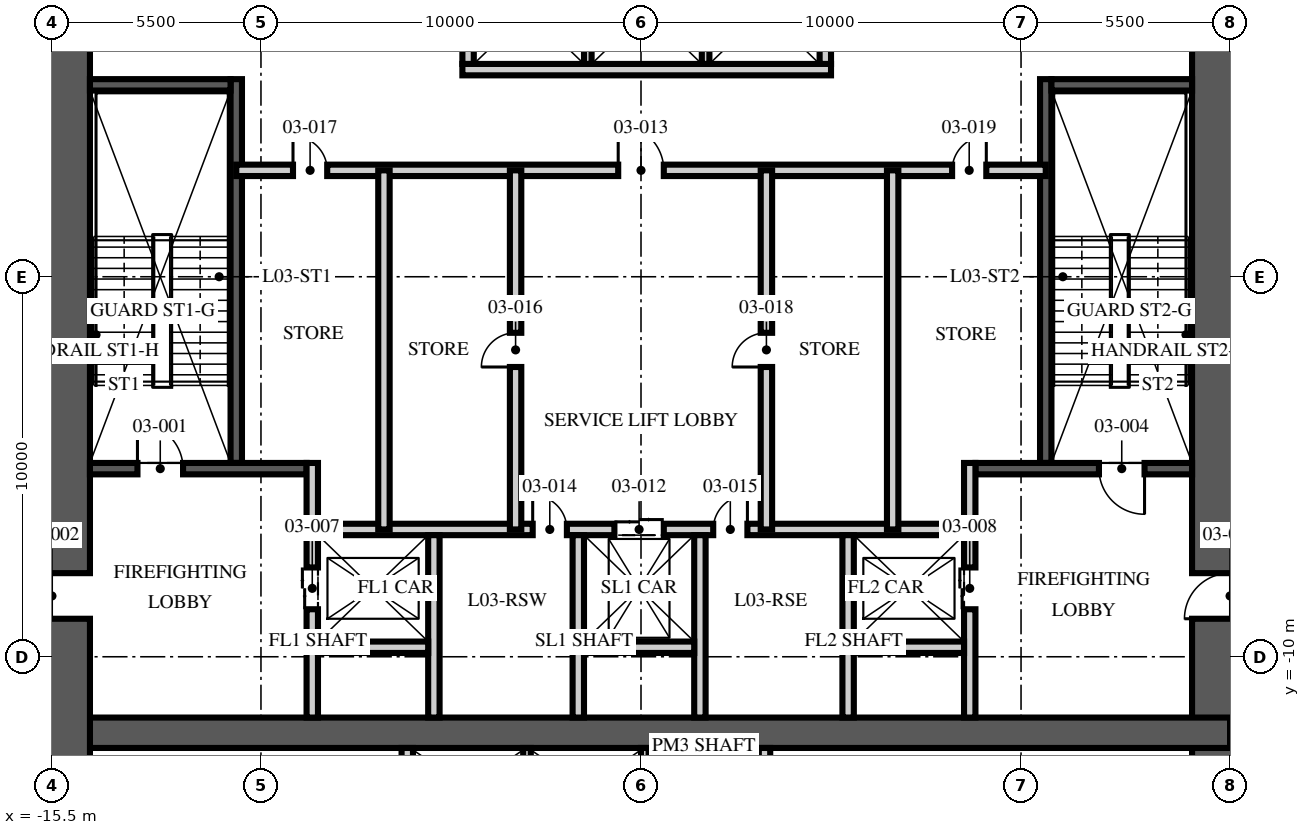
"""IFC4 building model, lengths in metres.
Left out: names, types, materials, properties, quantities, classifications, styles, units other than length and angle.
Written with IfcOpenShell. Run it as: python <this file> out.ifc"""

import sys

from ifc_helpers import new_model, si_unit, direction, frame, frame_2d, origin, place, context, subcontext, project, spatial, rectangle, extrude, element, fill, save


model = new_model("IFC4")
c1 = context("Model", 3, precision=1e-05, world=origin(), true_north=direction((0.0, 1.0)))
c2 = subcontext(c1, "Body", "Model", "MODEL_VIEW")
j1 = project(units=[si_unit("LENGTHUNIT", "METRE"), si_unit("PLANEANGLEUNIT", "RADIAN")], contexts=[c1])
p1 = place(None, origin())
s1 = spatial("IfcSite", under=j1, at=p1, CompositionType="ELEMENT")
p2 = place(p1, origin())
s2 = spatial("IfcBuilding", under=s1, at=p2, CompositionType="ELEMENT")
p3 = place(p2, frame((0.0, 0.0, 16.0)))
s3 = spatial("IfcBuildingStorey", under=s2, at=p3, CompositionType="ELEMENT", Elevation=16.0)
p4 = place(p3, frame((15.5, -15.5, -0.3), z_axis=(0.0, 0.0, 1.0), x_axis=(0.0, 1.0, 0.0)))
e1 = element("IfcWall", 1, at=p4, inside=s3, PredefinedType="SHEAR", context=c2, shape_type="SweptSolid", body=[
    extrude(rectangle(XDim=31.0, YDim=2.0, at=frame_2d((15.5, 0.0))), origin(), (0.0, 0.0, 1.0), 5.05),
])
p5 = place(p4, frame((6.5, 0.0, 0.3)))
e2 = element("IfcOpeningElement", 2, at=p5, cuts=e1, PredefinedType="OPENING", context=c2, shape_type="SweptSolid", body=[
    extrude(rectangle(XDim=1.2, YDim=2.1, at=frame_2d((0.6, 1.05))), frame((0.0, 1.01, 0.0), z_axis=(0.0, -1.0, 0.0), x_axis=(1.0, 0.0, 0.0)), (0.0, 0.0, 1.0), 2.02),
])
p6 = place(p4, frame((23.0, 0.0, 0.3)))
e3 = element("IfcOpeningElement", 3, at=p6, cuts=e1, PredefinedType="OPENING", context=c2, shape_type="SweptSolid", body=[
    extrude(rectangle(XDim=1.8, YDim=2.1, at=frame_2d((0.9, 1.05))), frame((0.0, 1.01, 0.0), z_axis=(0.0, -1.0, 0.0), x_axis=(1.0, 0.0, 0.0)), (0.0, 0.0, 1.0), 2.02),
])
p7 = place(p3, frame((-15.5, -12.0, -0.3), z_axis=(0.0, 0.0, 1.0), x_axis=(1.0, 0.0, 0.0)))
e4 = element("IfcWall", 4, at=p7, inside=s3, PredefinedType="SHEAR", context=c2, shape_type="SweptSolid", body=[
    extrude(rectangle(XDim=31.0, YDim=0.8, at=frame_2d((15.5, 0.0))), origin(), (0.0, 0.0, 1.0), 5.05),
])
p8 = place(p3, frame((-15.5, -15.5, -0.3), z_axis=(0.0, 0.0, 1.0), x_axis=(0.0, 1.0, 0.0)))
e5 = element("IfcWall", 5, at=p8, inside=s3, PredefinedType="SHEAR", context=c2, shape_type="SweptSolid", body=[
    extrude(rectangle(XDim=31.0, YDim=2.0, at=frame_2d((15.5, 0.0))), origin(), (0.0, 0.0, 1.0), 5.05),
])
p9 = place(p8, frame((6.5, 0.0, 0.3)))
e6 = element("IfcOpeningElement", 6, at=p9, cuts=e5, PredefinedType="OPENING", context=c2, shape_type="SweptSolid", body=[
    extrude(rectangle(XDim=1.2, YDim=2.1, at=frame_2d((0.6, 1.05))), frame((0.0, 1.01, 0.0), z_axis=(0.0, -1.0, 0.0), x_axis=(1.0, 0.0, 0.0)), (0.0, 0.0, 1.0), 2.02),
])
p10 = place(p8, frame((23.0, 0.0, 0.3)))
e7 = element("IfcOpeningElement", 7, at=p10, cuts=e5, PredefinedType="OPENING", context=c2, shape_type="SweptSolid", body=[
    extrude(rectangle(XDim=1.8, YDim=2.1, at=frame_2d((0.9, 1.05))), frame((0.0, 1.01, 0.0), z_axis=(0.0, -1.0, 0.0), x_axis=(1.0, 0.0, 0.0)), (0.0, 0.0, 1.0), 2.02),
])
p11 = place(p3, frame((-10.65, -4.9, 0.0), z_axis=(0.0, 0.0, 1.0), x_axis=(0.0, 1.0, 0.0)))
e8 = element("IfcWall", 8, at=p11, inside=s3, PredefinedType="SOLIDWALL", context=c2, shape_type="SweptSolid", body=[
    extrude(rectangle(XDim=10.1, YDim=0.3, at=frame_2d((5.05, 0.0))), origin(), (0.0, 0.0, 1.0), 4.75),
])
p12 = place(p3, frame((-14.5, -5.05, 0.0), z_axis=(0.0, 0.0, 1.0), x_axis=(1.0, 0.0, 0.0)))
e9 = element("IfcWall", 9, at=p12, inside=s3, PredefinedType="SOLIDWALL", context=c2, shape_type="SweptSolid", body=[
    extrude(rectangle(XDim=5.7, YDim=0.3, at=frame_2d((2.85, 0.0))), origin(), (0.0, 0.0, 1.0), 4.75),
])
p13 = place(p12, frame((1.25, 0.0, 0.0)))
e10 = element("IfcOpeningElement", 10, at=p13, cuts=e9, PredefinedType="OPENING", context=c2, shape_type="SweptSolid", body=[
    extrude(rectangle(XDim=1.2, YDim=2.1, at=frame_2d((0.6, 1.05))), frame((0.0, 0.16, 0.0), z_axis=(0.0, -1.0, 0.0), x_axis=(1.0, 0.0, 0.0)), (0.0, 0.0, 1.0), 0.32),
])
p14 = place(p3, frame((-14.5, 5.05, 0.0), z_axis=(0.0, 0.0, 1.0), x_axis=(1.0, 0.0, 0.0)))
e11 = element("IfcWall", 11, at=p14, inside=s3, PredefinedType="SOLIDWALL", context=c2, shape_type="SweptSolid", body=[
    extrude(rectangle(XDim=3.7, YDim=0.3, at=frame_2d((1.85, 0.0))), origin(), (0.0, 0.0, 1.0), 4.75),
])
p15 = place(p3, frame((-8.65, -11.6, 0.0), z_axis=(0.0, 0.0, 1.0), x_axis=(0.0, 1.0, 0.0)))
e12 = element("IfcWall", 12, at=p15, inside=s3, PredefinedType="PARTITIONING", context=c2, shape_type="SweptSolid", body=[
    extrude(rectangle(XDim=6.7, YDim=0.3, at=frame_2d((3.35, 0.0))), origin(), (0.0, 0.0, 1.0), 4.75),
])
p16 = place(p15, frame((2.85, 0.0, 0.0)))
e13 = element("IfcOpeningElement", 13, at=p16, cuts=e12, PredefinedType="OPENING", context=c2, shape_type="SweptSolid", body=[
    extrude(rectangle(XDim=1.1, YDim=2.1, at=frame_2d((0.55, 1.05))), frame((0.0, 0.16, 0.0), z_axis=(0.0, -1.0, 0.0), x_axis=(1.0, 0.0, 0.0)), (0.0, 0.0, 1.0), 0.32),
])
p17 = place(p3, frame((10.65, -4.9, 0.0), z_axis=(0.0, 0.0, 1.0), x_axis=(0.0, 1.0, 0.0)))
e14 = element("IfcWall", 14, at=p17, inside=s3, PredefinedType="SOLIDWALL", context=c2, shape_type="SweptSolid", body=[
    extrude(rectangle(XDim=10.1, YDim=0.3, at=frame_2d((5.05, 0.0))), origin(), (0.0, 0.0, 1.0), 4.75),
])
p18 = place(p3, frame((14.5, -5.05, 0.0), z_axis=(0.0, 0.0, 1.0), x_axis=(-1.0, 0.0, 0.0)))
e15 = element("IfcWall", 15, at=p18, inside=s3, PredefinedType="SOLIDWALL", context=c2, shape_type="SweptSolid", body=[
    extrude(rectangle(XDim=5.7, YDim=0.3, at=frame_2d((2.85, 0.0))), origin(), (0.0, 0.0, 1.0), 4.75),
])
p19 = place(p18, frame((1.25, 0.0, 0.0)))
e16 = element("IfcOpeningElement", 16, at=p19, cuts=e15, PredefinedType="OPENING", context=c2, shape_type="SweptSolid", body=[
    extrude(rectangle(XDim=1.2, YDim=2.1, at=frame_2d((0.6, 1.05))), frame((0.0, 0.16, 0.0), z_axis=(0.0, -1.0, 0.0), x_axis=(1.0, 0.0, 0.0)), (0.0, 0.0, 1.0), 0.32),
])
p20 = place(p3, frame((14.5, 5.05, 0.0), z_axis=(0.0, 0.0, 1.0), x_axis=(-1.0, 0.0, 0.0)))
e17 = element("IfcWall", 17, at=p20, inside=s3, PredefinedType="SOLIDWALL", context=c2, shape_type="SweptSolid", body=[
    extrude(rectangle(XDim=3.7, YDim=0.3, at=frame_2d((1.85, 0.0))), origin(), (0.0, 0.0, 1.0), 4.75),
])
p21 = place(p3, frame((8.65, -11.6, 0.0), z_axis=(0.0, 0.0, 1.0), x_axis=(0.0, 1.0, 0.0)))
e18 = element("IfcWall", 18, at=p21, inside=s3, PredefinedType="PARTITIONING", context=c2, shape_type="SweptSolid", body=[
    extrude(rectangle(XDim=6.7, YDim=0.3, at=frame_2d((3.35, 0.0))), origin(), (0.0, 0.0, 1.0), 4.75),
])
p22 = place(p21, frame((2.85, 0.0, 0.0)))
e19 = element("IfcOpeningElement", 19, at=p22, cuts=e18, PredefinedType="OPENING", context=c2, shape_type="SweptSolid", body=[
    extrude(rectangle(XDim=1.1, YDim=2.1, at=frame_2d((0.55, 1.05))), frame((0.0, 0.16, 0.0), z_axis=(0.0, -1.0, 0.0), x_axis=(1.0, 0.0, 0.0)), (0.0, 0.0, 1.0), 0.32),
])
p23 = place(p3, frame((-8.5, -6.65, 0.0), z_axis=(0.0, 0.0, 1.0), x_axis=(1.0, 0.0, 0.0)))
e20 = element("IfcWall", 20, at=p23, inside=s3, PredefinedType="PARTITIONING", context=c2, shape_type="SweptSolid", body=[
    extrude(rectangle(XDim=17.0, YDim=0.3, at=frame_2d((8.5, 0.0))), origin(), (0.0, 0.0, 1.0), 4.75),
])
p24 = place(p23, frame((7.8, 0.0, 0.0)))
e21 = element("IfcOpeningElement", 21, at=p24, cuts=e20, PredefinedType="OPENING", context=c2, shape_type="SweptSolid", body=[
    extrude(rectangle(XDim=1.3, YDim=2.4, at=frame_2d((0.65, 1.2))), frame((0.0, 0.16, 0.0), z_axis=(0.0, -1.0, 0.0), x_axis=(1.0, 0.0, 0.0)), (0.0, 0.0, 1.0), 0.32),
])
p25 = place(p23, frame((5.65, 0.0, 0.0)))
e22 = element("IfcOpeningElement", 22, at=p25, cuts=e20, PredefinedType="OPENING", context=c2, shape_type="SweptSolid", body=[
    extrude(rectangle(XDim=0.9, YDim=2.1, at=frame_2d((0.45, 1.05))), frame((0.0, 0.16, 0.0), z_axis=(0.0, -1.0, 0.0), x_axis=(1.0, 0.0, 0.0)), (0.0, 0.0, 1.0), 0.32),
])
p26 = place(p23, frame((10.4, 0.0, 0.0)))
e23 = element("IfcOpeningElement", 23, at=p26, cuts=e20, PredefinedType="OPENING", context=c2, shape_type="SweptSolid", body=[
    extrude(rectangle(XDim=0.9, YDim=2.1, at=frame_2d((0.45, 1.05))), frame((0.0, 0.16, 0.0), z_axis=(0.0, -1.0, 0.0), x_axis=(1.0, 0.0, 0.0)), (0.0, 0.0, 1.0), 0.32),
])
for number, where, z_axis, x_axis in (
    (24, (-5.45, -11.6, 0.0), (0.0, 0.0, 1.0), (0.0, 1.0, 0.0)),
    (25, (-1.65, -11.6, 0.0), (0.0, 0.0, 1.0), (0.0, 1.0, 0.0)),
    (26, (1.55, -11.6, 0.0), (0.0, 0.0, 1.0), (0.0, 1.0, 0.0)),
    (27, (5.45, -11.6, 0.0), (0.0, 0.0, 1.0), (0.0, 1.0, 0.0)),
):
    element("IfcWall", number, at=place(p3, frame(where, z_axis=z_axis, x_axis=x_axis)), inside=s3, PredefinedType="PARTITIONING", context=c2, shape_type="SweptSolid", body=[
        extrude(rectangle(XDim=4.8, YDim=0.3, at=frame_2d((2.4, 0.0))), origin(), (0.0, 0.0, 1.0), 4.75),
    ])
for number, where, z_axis, x_axis in (
    (28, (-8.5, -9.75, 0.0), (0.0, 0.0, 1.0), (1.0, 0.0, 0.0)),
    (29, (-1.5, -9.75, 0.0), (0.0, 0.0, 1.0), (1.0, 0.0, 0.0)),
    (30, (5.6, -9.75, 0.0), (0.0, 0.0, 1.0), (1.0, 0.0, 0.0)),
):
    element("IfcWall", number, at=place(p3, frame(where, z_axis=z_axis, x_axis=x_axis)), inside=s3, PredefinedType="PARTITIONING", context=c2, shape_type="SweptSolid", body=[
        extrude(rectangle(XDim=2.9, YDim=0.3, at=frame_2d((1.45, 0.0))), origin(), (0.0, 0.0, 1.0), 4.75),
    ])
p27 = place(p3, frame((-4.7, 5.45, 0.0), z_axis=(0.0, 0.0, 1.0), x_axis=(1.0, 0.0, 0.0)))
e31 = element("IfcWall", 31, at=p27, inside=s3, PredefinedType="PARTITIONING", context=c2, shape_type="SweptSolid", body=[
    extrude(rectangle(XDim=9.7, YDim=0.3, at=frame_2d((4.85, 0.0))), origin(), (0.0, 0.0, 1.0), 4.75),
])
for number, where, z_axis, x_axis in (
    (32, (-4.55, 5.6, 0.0), (0.0, 0.0, 1.0), (0.0, 1.0, 0.0)),
    (33, (4.85, 5.6, 0.0), (0.0, 0.0, 1.0), (0.0, 1.0, 0.0)),
):
    element("IfcWall", number, at=place(p3, frame(where, z_axis=z_axis, x_axis=x_axis)), inside=s3, PredefinedType="PARTITIONING", context=c2, shape_type="SweptSolid", body=[
        extrude(rectangle(XDim=2.8, YDim=0.3, at=frame_2d((1.4, 0.0))), origin(), (0.0, 0.0, 1.0), 4.75),
    ])
for number, where, z_axis, x_axis in (
    (34, (-1.4, 5.6, 0.0), (0.0, 0.0, 1.0), (0.0, 1.0, 0.0)),
    (35, (1.7, 5.6, 0.0), (0.0, 0.0, 1.0), (0.0, 1.0, 0.0)),
):
    element("IfcWall", number, at=place(p3, frame(where, z_axis=z_axis, x_axis=x_axis)), inside=s3, PredefinedType="PARTITIONING", context=c2, shape_type="SweptSolid", body=[
        extrude(rectangle(XDim=2.8, YDim=0.2, at=frame_2d((1.4, 0.0))), origin(), (0.0, 0.0, 1.0), 4.75),
    ])
for number, where, z_axis, x_axis in (
    (36, (-6.15, -14.5, 0.0), (0.0, 0.0, 1.0), (0.0, 1.0, 0.0)),
    (37, (3.25, -14.5, 0.0), (0.0, 0.0, 1.0), (0.0, 1.0, 0.0)),
):
    element("IfcWall", number, at=place(p3, frame(where, z_axis=z_axis, x_axis=x_axis)), inside=s3, PredefinedType="PARTITIONING", context=c2, shape_type="SweptSolid", body=[
        extrude(rectangle(XDim=2.1, YDim=0.3, at=frame_2d((1.05, 0.0))), origin(), (0.0, 0.0, 1.0), 4.75),
    ])
for number, where, z_axis, x_axis in (
    (38, (-3.0, -14.5, 0.0), (0.0, 0.0, 1.0), (0.0, 1.0, 0.0)),
    (39, (0.1, -14.5, 0.0), (0.0, 0.0, 1.0), (0.0, 1.0, 0.0)),
):
    element("IfcWall", number, at=place(p3, frame(where, z_axis=z_axis, x_axis=x_axis)), inside=s3, PredefinedType="PARTITIONING", context=c2, shape_type="SweptSolid", body=[
        extrude(rectangle(XDim=2.1, YDim=0.2, at=frame_2d((1.05, 0.0))), origin(), (0.0, 0.0, 1.0), 4.75),
    ])
p28 = place(p3, frame((-10.65, 2.8, 0.0), z_axis=(0.0, 0.0, 1.0), x_axis=(1.0, 0.0, 0.0)))
e40 = element("IfcWall", 40, at=p28, inside=s3, PredefinedType="PARTITIONING", context=c2, shape_type="SweptSolid", body=[
    extrude(rectangle(XDim=21.3, YDim=0.3, at=frame_2d((10.65, 0.0))), origin(), (0.0, 0.0, 1.0), 4.75),
])
p29 = place(p28, frame((10.05, 0.0, 0.0)))
e41 = element("IfcOpeningElement", 41, at=p29, cuts=e40, PredefinedType="OPENING", context=c2, shape_type="SweptSolid", body=[
    extrude(rectangle(XDim=1.2, YDim=2.1, at=frame_2d((0.6, 1.05))), frame((0.0, 0.16, 0.0), z_axis=(0.0, -1.0, 0.0), x_axis=(1.0, 0.0, 0.0)), (0.0, 0.0, 1.0), 0.32),
])
p30 = place(p28, frame((1.493, 0.0, 0.0)))
e42 = element("IfcOpeningElement", 42, at=p30, cuts=e40, PredefinedType="OPENING", context=c2, shape_type="SweptSolid", body=[
    extrude(rectangle(XDim=0.9, YDim=2.1, at=frame_2d((0.45, 1.05))), frame((0.0, 0.16, 0.0), z_axis=(0.0, -1.0, 0.0), x_axis=(1.0, 0.0, 0.0)), (0.0, 0.0, 1.0), 0.32),
])
p31 = place(p28, frame((18.836, 0.0, 0.0)))
e43 = element("IfcOpeningElement", 43, at=p31, cuts=e40, PredefinedType="OPENING", context=c2, shape_type="SweptSolid", body=[
    extrude(rectangle(XDim=0.9, YDim=2.1, at=frame_2d((0.45, 1.05))), frame((0.0, 0.16, 0.0), z_axis=(0.0, -1.0, 0.0), x_axis=(1.0, 0.0, 0.0)), (0.0, 0.0, 1.0), 0.32),
])
p32 = place(p3, frame((-3.3, -6.65, 0.0), z_axis=(0.0, 0.0, 1.0), x_axis=(0.0, 1.0, 0.0)))
e44 = element("IfcWall", 44, at=p32, inside=s3, PredefinedType="PARTITIONING", context=c2, shape_type="SweptSolid", body=[
    extrude(rectangle(XDim=9.45, YDim=0.3, at=frame_2d((4.725, 0.0))), origin(), (0.0, 0.0, 1.0), 4.75),
])
p33 = place(p32, frame((4.275, 0.0, 0.0)))
e45 = element("IfcOpeningElement", 45, at=p33, cuts=e44, PredefinedType="OPENING", context=c2, shape_type="SweptSolid", body=[
    extrude(rectangle(XDim=0.9, YDim=2.1, at=frame_2d((0.45, 1.05))), frame((0.0, 0.16, 0.0), z_axis=(0.0, -1.0, 0.0), x_axis=(1.0, 0.0, 0.0)), (0.0, 0.0, 1.0), 0.32),
])
p34 = place(p3, frame((3.3, -6.65, 0.0), z_axis=(0.0, 0.0, 1.0), x_axis=(0.0, 1.0, 0.0)))
e46 = element("IfcWall", 46, at=p34, inside=s3, PredefinedType="PARTITIONING", context=c2, shape_type="SweptSolid", body=[
    extrude(rectangle(XDim=9.45, YDim=0.3, at=frame_2d((4.725, 0.0))), origin(), (0.0, 0.0, 1.0), 4.75),
])
p35 = place(p34, frame((4.275, 0.0, 0.0)))
e47 = element("IfcOpeningElement", 47, at=p35, cuts=e46, PredefinedType="OPENING", context=c2, shape_type="SweptSolid", body=[
    extrude(rectangle(XDim=0.9, YDim=2.1, at=frame_2d((0.45, 1.05))), frame((0.0, 0.16, 0.0), z_axis=(0.0, -1.0, 0.0), x_axis=(1.0, 0.0, 0.0)), (0.0, 0.0, 1.0), 0.32),
])
for number, where, z_axis, x_axis in (
    (48, (-6.764, -6.65, 0.0), (0.0, 0.0, 1.0), (0.0, 1.0, 0.0)),
    (49, (6.622, -6.65, 0.0), (0.0, 0.0, 1.0), (0.0, 1.0, 0.0)),
):
    element("IfcWall", number, at=place(p3, frame(where, z_axis=z_axis, x_axis=x_axis)), inside=s3, PredefinedType="PARTITIONING", context=c2, shape_type="SweptSolid", body=[
        extrude(rectangle(XDim=9.45, YDim=0.3, at=frame_2d((4.725, 0.0))), origin(), (0.0, 0.0, 1.0), 4.75),
    ])
p36 = place(p13, origin())
e50 = element("IfcDoor", 50, at=p36, inside=s3, OperationType="SINGLE_SWING_LEFT", PredefinedType="DOOR", context=c2, shape_type="SweptSolid", body=[
    extrude(rectangle(XDim=1.2, YDim=2.1, at=frame_2d((0.6, 1.05))), frame((0.0, 0.025, 0.0), z_axis=(0.0, -1.0, 0.0), x_axis=(1.0, 0.0, 0.0)), (0.0, 0.0, 1.0), 0.05),
])
fill(e10, e50)
p37 = place(p9, origin())
e51 = element("IfcDoor", 51, at=p37, inside=s3, OperationType="SINGLE_SWING_LEFT", PredefinedType="DOOR", context=c2, shape_type="SweptSolid", body=[
    extrude(rectangle(XDim=1.2, YDim=2.1, at=frame_2d((0.6, 1.05))), frame((0.0, 0.025, 0.0), z_axis=(0.0, -1.0, 0.0), x_axis=(1.0, 0.0, 0.0)), (0.0, 0.0, 1.0), 0.05),
])
fill(e6, e51)
p38 = place(p19, origin())
e52 = element("IfcDoor", 52, at=p38, inside=s3, OperationType="SINGLE_SWING_LEFT", PredefinedType="DOOR", context=c2, shape_type="SweptSolid", body=[
    extrude(rectangle(XDim=1.2, YDim=2.1, at=frame_2d((0.6, 1.05))), frame((0.0, 0.025, 0.0), z_axis=(0.0, -1.0, 0.0), x_axis=(1.0, 0.0, 0.0)), (0.0, 0.0, 1.0), 0.05),
])
fill(e16, e52)
p39 = place(p5, origin())
e53 = element("IfcDoor", 53, at=p39, inside=s3, OperationType="SINGLE_SWING_LEFT", PredefinedType="DOOR", context=c2, shape_type="SweptSolid", body=[
    extrude(rectangle(XDim=1.2, YDim=2.1, at=frame_2d((0.6, 1.05))), frame((0.0, 0.025, 0.0), z_axis=(0.0, -1.0, 0.0), x_axis=(1.0, 0.0, 0.0)), (0.0, 0.0, 1.0), 0.05),
])
fill(e2, e53)
p40 = place(p16, origin())
e54 = element("IfcDoor", 54, at=p40, inside=s3, OperationType="DOUBLE_DOOR_SLIDING", PredefinedType="DOOR", context=c2, shape_type="SweptSolid", body=[
    extrude(rectangle(XDim=1.1, YDim=2.1, at=frame_2d((0.55, 1.05))), frame((0.0, 0.025, 0.0), z_axis=(0.0, -1.0, 0.0), x_axis=(1.0, 0.0, 0.0)), (0.0, 0.0, 1.0), 0.05),
])
fill(e13, e54)
p41 = place(p22, origin())
e55 = element("IfcDoor", 55, at=p41, inside=s3, OperationType="DOUBLE_DOOR_SLIDING", PredefinedType="DOOR", context=c2, shape_type="SweptSolid", body=[
    extrude(rectangle(XDim=1.1, YDim=2.1, at=frame_2d((0.55, 1.05))), frame((0.0, 0.025, 0.0), z_axis=(0.0, -1.0, 0.0), x_axis=(1.0, 0.0, 0.0)), (0.0, 0.0, 1.0), 0.05),
])
fill(e19, e55)
p42 = place(p24, origin())
e56 = element("IfcDoor", 56, at=p42, inside=s3, OperationType="DOUBLE_DOOR_SLIDING", PredefinedType="DOOR", context=c2, shape_type="SweptSolid", body=[
    extrude(rectangle(XDim=1.3, YDim=2.4, at=frame_2d((0.65, 1.2))), frame((0.0, 0.025, 0.0), z_axis=(0.0, -1.0, 0.0), x_axis=(1.0, 0.0, 0.0)), (0.0, 0.0, 1.0), 0.05),
])
fill(e21, e56)
p43 = place(p29, origin())
e57 = element("IfcDoor", 57, at=p43, inside=s3, OperationType="SINGLE_SWING_LEFT", PredefinedType="DOOR", context=c2, shape_type="SweptSolid", body=[
    extrude(rectangle(XDim=1.2, YDim=2.1, at=frame_2d((0.6, 1.05))), frame((0.0, 0.025, 0.0), z_axis=(0.0, -1.0, 0.0), x_axis=(1.0, 0.0, 0.0)), (0.0, 0.0, 1.0), 0.05),
])
fill(e41, e57)
p44 = place(p25, origin())
e58 = element("IfcDoor", 58, at=p44, inside=s3, OperationType="SINGLE_SWING_LEFT", PredefinedType="DOOR", context=c2, shape_type="SweptSolid", body=[
    extrude(rectangle(XDim=0.9, YDim=2.1, at=frame_2d((0.45, 1.05))), frame((0.0, 0.025, 0.0), z_axis=(0.0, -1.0, 0.0), x_axis=(1.0, 0.0, 0.0)), (0.0, 0.0, 1.0), 0.05),
])
fill(e22, e58)
p45 = place(p26, origin())
e59 = element("IfcDoor", 59, at=p45, inside=s3, OperationType="SINGLE_SWING_RIGHT", PredefinedType="DOOR", context=c2, shape_type="SweptSolid", body=[
    extrude(rectangle(XDim=0.9, YDim=2.1, at=frame_2d((0.45, 1.05))), frame((0.0, 0.025, 0.0), z_axis=(0.0, -1.0, 0.0), x_axis=(1.0, 0.0, 0.0)), (0.0, 0.0, 1.0), 0.05),
])
fill(e23, e59)
p46 = place(p33, origin())
e60 = element("IfcDoor", 60, at=p46, inside=s3, OperationType="SINGLE_SWING_LEFT", PredefinedType="DOOR", context=c2, shape_type="SweptSolid", body=[
    extrude(rectangle(XDim=0.9, YDim=2.1, at=frame_2d((0.45, 1.05))), frame((0.0, 0.025, 0.0), z_axis=(0.0, -1.0, 0.0), x_axis=(1.0, 0.0, 0.0)), (0.0, 0.0, 1.0), 0.05),
])
fill(e45, e60)
p47 = place(p30, origin())
e61 = element("IfcDoor", 61, at=p47, inside=s3, OperationType="SINGLE_SWING_LEFT", PredefinedType="DOOR", context=c2, shape_type="SweptSolid", body=[
    extrude(rectangle(XDim=0.9, YDim=2.1, at=frame_2d((0.45, 1.05))), frame((0.0, 0.025, 0.0), z_axis=(0.0, -1.0, 0.0), x_axis=(1.0, 0.0, 0.0)), (0.0, 0.0, 1.0), 0.05),
])
fill(e42, e61)
p48 = place(p35, origin())
e62 = element("IfcDoor", 62, at=p48, inside=s3, OperationType="SINGLE_SWING_LEFT", PredefinedType="DOOR", context=c2, shape_type="SweptSolid", body=[
    extrude(rectangle(XDim=0.9, YDim=2.1, at=frame_2d((0.45, 1.05))), frame((0.0, 0.025, 0.0), z_axis=(0.0, -1.0, 0.0), x_axis=(1.0, 0.0, 0.0)), (0.0, 0.0, 1.0), 0.05),
])
fill(e47, e62)
p49 = place(p31, origin())
e63 = element("IfcDoor", 63, at=p49, inside=s3, OperationType="SINGLE_SWING_RIGHT", PredefinedType="DOOR", context=c2, shape_type="SweptSolid", body=[
    extrude(rectangle(XDim=0.9, YDim=2.1, at=frame_2d((0.45, 1.05))), frame((0.0, 0.025, 0.0), z_axis=(0.0, -1.0, 0.0), x_axis=(1.0, 0.0, 0.0)), (0.0, 0.0, 1.0), 0.05),
])
fill(e43, e63)
save(model, sys.argv[1])
